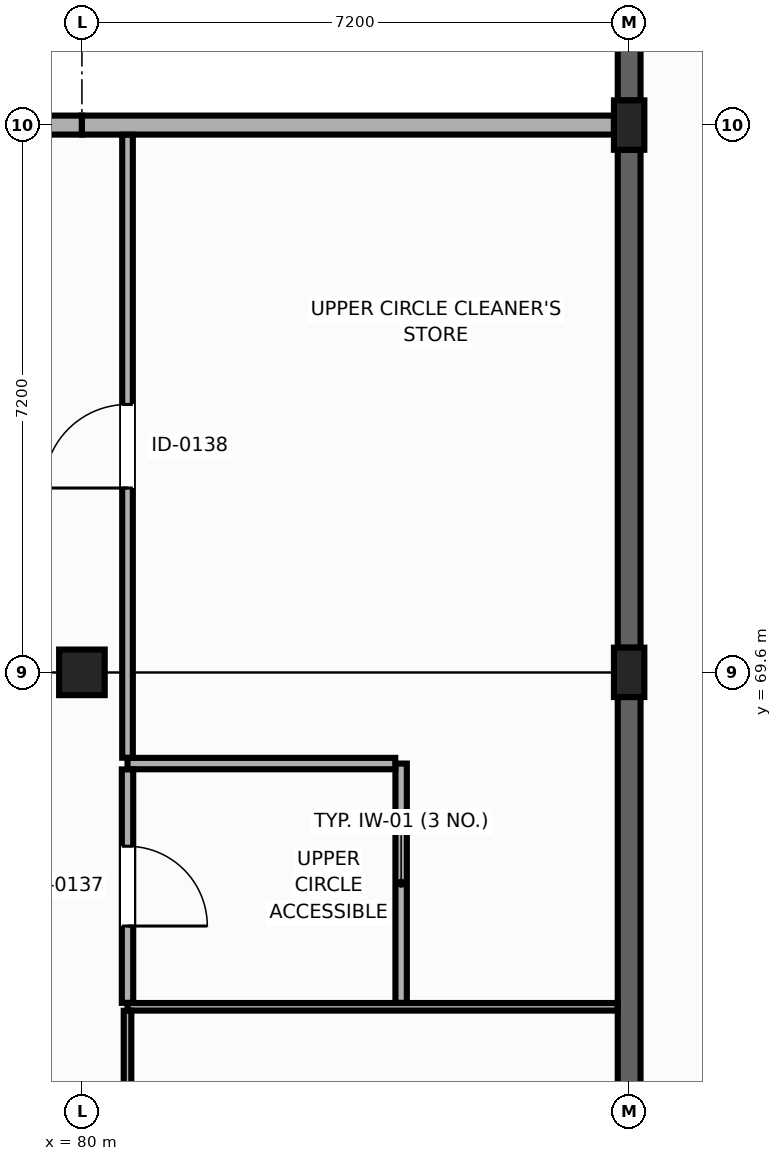
"""IFC4 building model, lengths in metres.
Left out: names, types, materials, properties, quantities, classifications, styles, units other than length and angle.
Written with IfcOpenShell. Run it as: python <this file> out.ifc"""

import sys

from ifc_helpers import new_model, si_unit, direction, frame, frame_2d, origin, origin_2d, place, context, subcontext, project, spatial, rectangle, extrude, element, fill, save


model = new_model("IFC4")
c1 = context("Model", 3, precision=1e-05, world=origin(), true_north=direction((0.0, 1.0)))
c2 = subcontext(c1, "Body", "Model", "MODEL_VIEW")
j1 = project(units=[si_unit("LENGTHUNIT", "METRE"), si_unit("PLANEANGLEUNIT", "RADIAN")], contexts=[c1])
p1 = place(None, origin())
s1 = spatial("IfcSite", under=j1, at=p1, CompositionType="ELEMENT")
p2 = place(p1, origin())
s2 = spatial("IfcBuilding", under=s1, at=p2, CompositionType="ELEMENT")
p3 = place(p2, frame((0.0, 0.0, 9.9)))
s3 = spatial("IfcBuildingStorey", under=s2, at=p3, CompositionType="ELEMENT", Elevation=9.9)
p4 = place(p3, frame((80.0, 69.6, 0.0), z_axis=(0.0, 0.0, 1.0), x_axis=(0.0, 1.0, 0.0)))
e1 = element("IfcColumn", 1, at=p4, inside=s3, PredefinedType="COLUMN", context=c2, shape_type="SweptSolid", body=[
    extrude(rectangle(XDim=0.6, YDim=0.6, at=origin_2d()), origin(), (0.0, 0.0, 1.0), 4.28),
])
for number, where, z_axis, x_axis in (
    (2, (87.2, 69.6, 0.0), (0.0, 0.0, 1.0), (1.0, 0.0, 0.0)),
    (3, (87.2, 76.8, 0.0), (0.0, 0.0, 1.0), (1.0, 0.0, 0.0)),
):
    element("IfcColumn", number, at=place(p3, frame(where, z_axis=z_axis, x_axis=x_axis)), inside=s3, PredefinedType="PILASTER", context=c2, shape_type="SweptSolid", body=[
        extrude(rectangle(XDim=0.4, YDim=0.65, at=origin_2d()), origin(), (0.0, 0.0, 1.0), 4.5),
    ])
p5 = place(p3, frame((72.675, 76.8, 0.0), z_axis=(0.0, 0.0, 1.0), x_axis=(1.0, 0.0, 0.0)))
e4 = element("IfcWall", 4, at=p5, inside=s3, PredefinedType="SOLIDWALL", context=c2, shape_type="SweptSolid", body=[
    extrude(rectangle(XDim=7.325, YDim=0.25, at=frame_2d((3.663, 0.0))), origin(), (0.0, 0.0, 1.0), 4.28),
])
p6 = place(p5, frame((2.163, 0.0, 1.8)))
e5 = element("IfcOpeningElement", 5, at=p6, cuts=e4, PredefinedType="OPENING", context=c2, shape_type="SweptSolid", body=[
    extrude(rectangle(XDim=3.0, YDim=1.2, at=frame_2d((1.5, 0.6))), frame((0.0, 0.135, 0.0), z_axis=(0.0, -1.0, 0.0), x_axis=(1.0, 0.0, 0.0)), (0.0, 0.0, 1.0), 0.27),
])
p7 = place(p3, frame((80.0, 76.8, 0.0), z_axis=(0.0, 0.0, 1.0), x_axis=(1.0, 0.0, 0.0)))
e6 = element("IfcWall", 6, at=p7, inside=s3, PredefinedType="SOLIDWALL", context=c2, shape_type="SweptSolid", body=[
    extrude(rectangle(XDim=7.0, YDim=0.25, at=frame_2d((3.5, 0.0))), origin(), (0.0, 0.0, 1.0), 4.25),
])
p8 = place(p3, frame((87.2, 62.6, 0.0), z_axis=(0.0, 0.0, 1.0), x_axis=(0.0, 1.0, 0.0)))
e7 = element("IfcWall", 7, at=p8, inside=s3, PredefinedType="SHEAR", context=c2, shape_type="SweptSolid", body=[
    extrude(rectangle(XDim=6.675, YDim=0.3, at=frame_2d((3.337, 0.0))), origin(), (0.0, 0.0, 1.0), 4.25),
])
p9 = place(p3, frame((87.2, 69.925, 0.0), z_axis=(0.0, 0.0, 1.0), x_axis=(0.0, 1.0, 0.0)))
e8 = element("IfcWall", 8, at=p9, inside=s3, PredefinedType="SHEAR", context=c2, shape_type="SweptSolid", body=[
    extrude(rectangle(XDim=6.55, YDim=0.3, at=frame_2d((3.275, 0.0))), origin(), (0.0, 0.0, 1.0), 4.25),
])
p10 = place(p3, frame((87.2, 77.125, 0.0), z_axis=(0.0, 0.0, 1.0), x_axis=(0.0, 1.0, 0.0)))
e9 = element("IfcWall", 9, at=p10, inside=s3, PredefinedType="SHEAR", context=c2, shape_type="SweptSolid", body=[
    extrude(rectangle(XDim=6.689, YDim=0.3, at=frame_2d((3.344, 0.0))), origin(), (0.0, 0.0, 1.0), 4.25),
])
p11 = place(p3, frame((87.048, 65.2, 0.0), z_axis=(0.0, 0.0, 1.0), x_axis=(-1.0, 0.0, 0.0)))
e10 = element("IfcWall", 10, at=p11, inside=s3, PredefinedType="PARTITIONING", context=c2, shape_type="SweptSolid", body=[
    extrude(rectangle(XDim=6.448, YDim=0.1, at=frame_2d((3.224, 0.0))), origin(), (0.0, 0.0, 1.0), 4.28),
])
p12 = place(p3, frame((80.6, 65.148, 0.0), z_axis=(0.0, 0.0, 1.0), x_axis=(0.0, -1.0, 0.0)))
e11 = element("IfcWall", 11, at=p12, inside=s3, PredefinedType="PARTITIONING", context=c2, shape_type="SweptSolid", body=[
    extrude(rectangle(XDim=6.348, YDim=0.1, at=frame_2d((3.174, 0.0))), origin(), (0.0, 0.0, 1.0), 3.775),
])
p13 = place(p3, frame((84.2, 65.252, 0.0), z_axis=(0.0, 0.0, 1.0), x_axis=(0.0, 1.0, 0.0)))
e12 = element("IfcWall", 12, at=p13, inside=s3, PredefinedType="PARTITIONING", context=c2, shape_type="SweptSolid", body=[
    extrude(rectangle(XDim=3.148, YDim=0.15, at=frame_2d((1.574, 0.0))), origin(), (0.0, 0.0, 1.0), 3.915),
])
p14 = place(p3, frame((84.123, 68.4, 0.0), z_axis=(0.0, 0.0, 1.0), x_axis=(-1.0, 0.0, 0.0)))
e13 = element("IfcWall", 13, at=p14, inside=s3, PredefinedType="PARTITIONING", context=c2, shape_type="SweptSolid", body=[
    extrude(rectangle(XDim=3.523, YDim=0.15, at=frame_2d((1.761, 0.0))), origin(), (0.0, 0.0, 1.0), 4.28),
])
p15 = place(p3, frame((80.6, 68.323, 0.0), z_axis=(0.0, 0.0, 1.0), x_axis=(0.0, -1.0, 0.0)))
e14 = element("IfcWall", 14, at=p15, inside=s3, PredefinedType="PARTITIONING", context=c2, shape_type="SweptSolid", body=[
    extrude(rectangle(XDim=3.071, YDim=0.15, at=frame_2d((1.536, 0.0))), origin(), (0.0, 0.0, 1.0), 3.915),
])
p16 = place(p15, frame((1.01, 0.0, 0.0)))
e15 = element("IfcOpeningElement", 15, at=p16, cuts=e14, PredefinedType="OPENING", context=c2, shape_type="SweptSolid", body=[
    extrude(rectangle(XDim=1.05, YDim=2.12, at=frame_2d((0.525, 1.06))), frame((0.0, 0.085, 0.0), z_axis=(0.0, -1.0, 0.0), x_axis=(1.0, 0.0, 0.0)), (0.0, 0.0, 1.0), 0.17),
])
p17 = place(p3, frame((80.6, 68.477, 0.0), z_axis=(0.0, 0.0, 1.0), x_axis=(0.0, 1.0, 0.0)))
e16 = element("IfcWall", 16, at=p17, inside=s3, PredefinedType="PARTITIONING", context=c2, shape_type="SweptSolid", body=[
    extrude(rectangle(XDim=8.196, YDim=0.14, at=frame_2d((4.098, 0.0))), origin(), (0.0, 0.0, 1.0), 3.745),
])
p18 = place(p17, frame((3.548, 0.0, 0.0)))
e17 = element("IfcOpeningElement", 17, at=p18, cuts=e16, PredefinedType="OPENING", context=c2, shape_type="SweptSolid", body=[
    extrude(rectangle(XDim=1.1, YDim=2.15, at=frame_2d((0.55, 1.075))), frame((0.0, 0.08, 0.0), z_axis=(0.0, -1.0, 0.0), x_axis=(1.0, 0.0, 0.0)), (0.0, 0.0, 1.0), 0.16),
])
p19 = place(p16, origin())
e18 = element("IfcDoor", 18, at=p19, inside=s3, OperationType="SINGLE_SWING_RIGHT", PredefinedType="DOOR", context=c2, shape_type="SweptSolid", body=[
    extrude(rectangle(XDim=1.05, YDim=2.12, at=frame_2d((0.525, 1.06))), frame((0.0, 0.025, 0.0), z_axis=(0.0, -1.0, 0.0), x_axis=(1.0, 0.0, 0.0)), (0.0, 0.0, 1.0), 0.05),
])
fill(e15, e18)
p20 = place(p18, origin())
e19 = element("IfcDoor", 19, at=p20, inside=s3, OperationType="SINGLE_SWING_LEFT", PredefinedType="DOOR", context=c2, shape_type="SweptSolid", body=[
    extrude(rectangle(XDim=1.1, YDim=2.15, at=frame_2d((0.55, 1.075))), frame((0.0, 0.025, 0.0), z_axis=(0.0, -1.0, 0.0), x_axis=(1.0, 0.0, 0.0)), (0.0, 0.0, 1.0), 0.05),
])
fill(e17, e19)
save(model, sys.argv[1])
